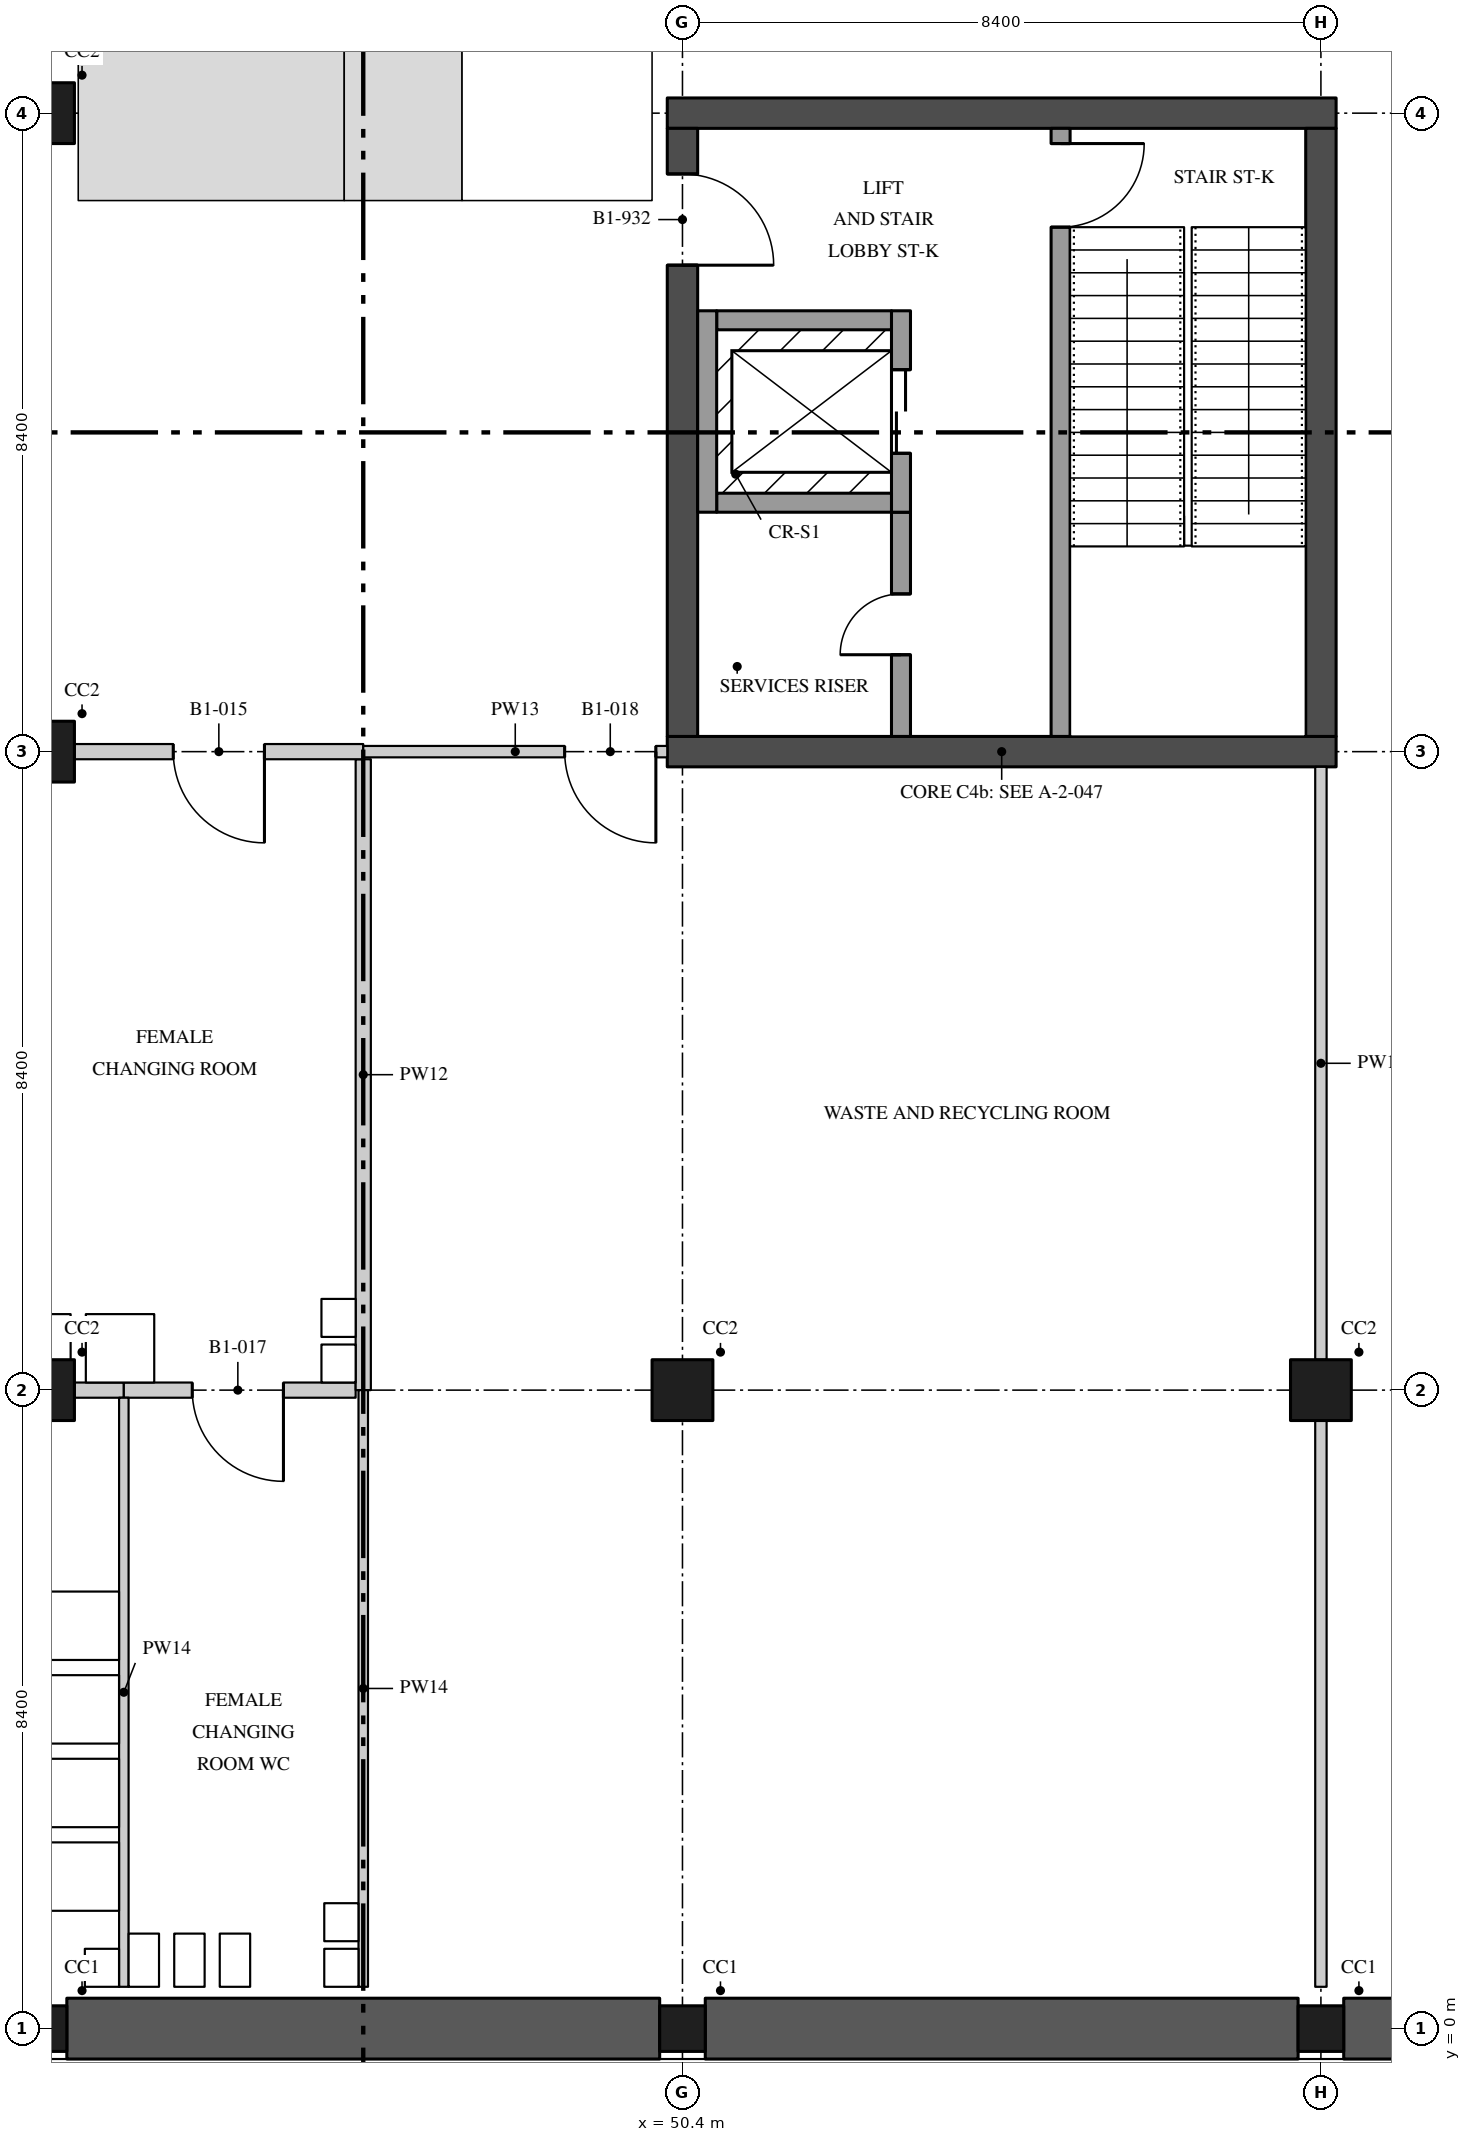
"""IFC4 building model, lengths in metres.
Left out: names, types, materials, properties, quantities, classifications, styles, units other than length and angle.
Written with IfcOpenShell. Run it as: python <this file> out.ifc"""

import sys

from ifc_helpers import new_model, si_unit, direction, frame, frame_2d, origin, origin_2d, place, context, subcontext, project, spatial, rectangle, extrude, element, fill, save


model = new_model("IFC4")
c1 = context("Model", 3, precision=1e-05, world=origin(), true_north=direction((0.0, 1.0)))
c2 = subcontext(c1, "Body", "Model", "MODEL_VIEW")
j1 = project(units=[si_unit("LENGTHUNIT", "METRE"), si_unit("PLANEANGLEUNIT", "RADIAN")], contexts=[c1])
p1 = place(None, origin())
s1 = spatial("IfcSite", under=j1, at=p1, CompositionType="ELEMENT")
p2 = place(p1, origin())
s2 = spatial("IfcBuilding", under=s1, at=p2, CompositionType="ELEMENT")
p3 = place(p2, frame((0.0, 0.0, -4.5)))
s3 = spatial("IfcBuildingStorey", under=s2, at=p3, CompositionType="ELEMENT", Elevation=-4.5)
p4 = place(p3, frame((42.0, 0.0, 0.0), z_axis=(0.0, 0.0, 1.0), x_axis=(1.0, 0.0, 0.0)))
e1 = element("IfcColumn", 1, at=p4, inside=s3, PredefinedType="COLUMN", context=c2, shape_type="SweptSolid", body=[
    extrude(rectangle(XDim=0.6, YDim=0.6, at=origin_2d()), origin(), (0.0, 0.0, 1.0), 4.05),
])
for number, where, z_axis, x_axis in (
    (2, (42.0, 8.4, 0.0), (0.0, 0.0, 1.0), (1.0, 0.0, 0.0)),
    (3, (42.0, 16.8, 0.0), (0.0, 0.0, 1.0), (1.0, 0.0, 0.0)),
    (4, (42.0, 25.2, 0.0), (0.0, 0.0, 1.0), (1.0, 0.0, 0.0)),
):
    element("IfcColumn", number, at=place(p3, frame(where, z_axis=z_axis, x_axis=x_axis)), inside=s3, PredefinedType="COLUMN", context=c2, shape_type="SweptSolid", body=[
        extrude(rectangle(XDim=0.8, YDim=0.8, at=origin_2d()), origin(), (0.0, 0.0, 1.0), 4.05),
    ])
p5 = place(p3, frame((50.4, 0.0, 0.0), z_axis=(0.0, 0.0, 1.0), x_axis=(1.0, 0.0, 0.0)))
e5 = element("IfcColumn", 5, at=p5, inside=s3, PredefinedType="COLUMN", context=c2, shape_type="SweptSolid", body=[
    extrude(rectangle(XDim=0.6, YDim=0.6, at=origin_2d()), origin(), (0.0, 0.0, 1.0), 4.05),
])
p6 = place(p3, frame((50.4, 8.4, 0.0), z_axis=(0.0, 0.0, 1.0), x_axis=(1.0, 0.0, 0.0)))
e6 = element("IfcColumn", 6, at=p6, inside=s3, PredefinedType="COLUMN", context=c2, shape_type="SweptSolid", body=[
    extrude(rectangle(XDim=0.8, YDim=0.8, at=origin_2d()), origin(), (0.0, 0.0, 1.0), 4.05),
])
p7 = place(p3, frame((58.8, 0.0, 0.0), z_axis=(0.0, 0.0, 1.0), x_axis=(1.0, 0.0, 0.0)))
e7 = element("IfcColumn", 7, at=p7, inside=s3, PredefinedType="COLUMN", context=c2, shape_type="SweptSolid", body=[
    extrude(rectangle(XDim=0.6, YDim=0.6, at=origin_2d()), origin(), (0.0, 0.0, 1.0), 4.05),
])
p8 = place(p3, frame((58.8, 8.4, 0.0), z_axis=(0.0, 0.0, 1.0), x_axis=(1.0, 0.0, 0.0)))
e8 = element("IfcColumn", 8, at=p8, inside=s3, PredefinedType="COLUMN", context=c2, shape_type="SweptSolid", body=[
    extrude(rectangle(XDim=0.8, YDim=0.8, at=origin_2d()), origin(), (0.0, 0.0, 1.0), 4.05),
])
for number, where, z_axis, x_axis in (
    (9, (42.3, 0.0, 0.0), (0.0, 0.0, 1.0), (1.0, 0.0, 0.0)),
    (10, (50.7, 0.0, 0.0), (0.0, 0.0, 1.0), (1.0, 0.0, 0.0)),
):
    element("IfcWall", number, at=place(p3, frame(where, z_axis=z_axis, x_axis=x_axis)), inside=s3, PredefinedType="SOLIDWALL", context=c2, shape_type="SweptSolid", body=[
        extrude(rectangle(XDim=7.8, YDim=0.8, at=frame_2d((3.9, 0.0))), origin(), (0.0, 0.0, 1.0), 4.05),
    ])
p9 = place(p3, frame((59.1, 0.0, 0.0), z_axis=(0.0, 0.0, 1.0), x_axis=(1.0, 0.0, 0.0)))
e11 = element("IfcWall", 11, at=p9, inside=s3, PredefinedType="SOLIDWALL", context=c2, shape_type="SweptSolid", body=[
    extrude(rectangle(XDim=7.8, YDim=0.8, at=frame_2d((3.9, 0.0))), origin(), (0.0, 0.0, 1.0), 4.05),
])
for number, where, z_axis, x_axis in (
    (12, (50.2, 16.8, 0.0), (0.0, 0.0, 1.0), (1.0, 0.0, 0.0)),
    (13, (50.2, 25.2, 0.0), (0.0, 0.0, 1.0), (1.0, 0.0, 0.0)),
):
    element("IfcWall", number, at=place(p3, frame(where, z_axis=z_axis, x_axis=x_axis)), inside=s3, PredefinedType="SHEAR", context=c2, shape_type="SweptSolid", body=[
        extrude(rectangle(XDim=8.8, YDim=0.4, at=frame_2d((4.4, 0.0))), origin(), (0.0, 0.0, 1.0), 4.05),
    ])
p10 = place(p3, frame((50.4, 17.0, 0.0), z_axis=(0.0, 0.0, 1.0), x_axis=(0.0, 1.0, 0.0)))
e14 = element("IfcWall", 14, at=p10, inside=s3, PredefinedType="SHEAR", context=c2, shape_type="SweptSolid", body=[
    extrude(rectangle(XDim=8.0, YDim=0.4, at=frame_2d((4.0, 0.0))), origin(), (0.0, 0.0, 1.0), 4.05),
])
p11 = place(p10, frame((6.2, 0.0, 0.0)))
e15 = element("IfcOpeningElement", 15, at=p11, cuts=e14, PredefinedType="OPENING", context=c2, shape_type="SweptSolid", body=[
    extrude(rectangle(XDim=1.2, YDim=2.1, at=frame_2d((0.6, 1.05))), frame((0.0, 0.21, 0.0), z_axis=(0.0, -1.0, 0.0), x_axis=(1.0, 0.0, 0.0)), (0.0, 0.0, 1.0), 0.42),
])
p12 = place(p3, frame((58.8, 17.0, 0.0), z_axis=(0.0, 0.0, 1.0), x_axis=(0.0, 1.0, 0.0)))
e16 = element("IfcWall", 16, at=p12, inside=s3, PredefinedType="SHEAR", context=c2, shape_type="SweptSolid", body=[
    extrude(rectangle(XDim=8.0, YDim=0.4, at=frame_2d((4.0, 0.0))), origin(), (0.0, 0.0, 1.0), 4.05),
])
p13 = place(p3, frame((55.375, 25.0, 0.0), z_axis=(0.0, 0.0, 1.0), x_axis=(0.0, -1.0, 0.0)))
e17 = element("IfcWall", 17, at=p13, inside=s3, PredefinedType="SOLIDWALL", context=c2, shape_type="SweptSolid", body=[
    extrude(rectangle(XDim=8.0, YDim=0.25, at=frame_2d((4.0, 0.0))), origin(), (0.0, 0.0, 1.0), 4.05),
])
p14 = place(p13, frame((0.2, 0.0, 0.0)))
e18 = element("IfcOpeningElement", 18, at=p14, cuts=e17, PredefinedType="OPENING", context=c2, shape_type="SweptSolid", body=[
    extrude(rectangle(XDim=1.1, YDim=2.1, at=frame_2d((0.55, 1.05))), frame((0.0, 0.135, 0.0), z_axis=(0.0, -1.0, 0.0), x_axis=(1.0, 0.0, 0.0)), (0.0, 0.0, 1.0), 0.27),
])
p15 = place(p3, frame((53.275, 19.95, 0.0), z_axis=(0.0, 0.0, 1.0), x_axis=(0.0, -1.0, 0.0)))
e19 = element("IfcWall", 19, at=p15, inside=s3, PredefinedType="SOLIDWALL", context=c2, shape_type="SweptSolid", body=[
    extrude(rectangle(XDim=2.95, YDim=0.25, at=frame_2d((1.475, 0.0))), origin(), (0.0, 0.0, 1.0), 4.05),
])
p16 = place(p15, frame((1.075, 0.0, 0.0)))
e20 = element("IfcOpeningElement", 20, at=p16, cuts=e19, PredefinedType="OPENING", context=c2, shape_type="SweptSolid", body=[
    extrude(rectangle(XDim=0.8, YDim=2.1, at=frame_2d((0.4, 1.05))), frame((0.0, 0.135, 0.0), z_axis=(0.0, -1.0, 0.0), x_axis=(1.0, 0.0, 0.0)), (0.0, 0.0, 1.0), 0.27),
])
p17 = place(p3, frame((53.275, 19.95, 0.0), z_axis=(0.0, 0.0, 1.0), x_axis=(0.0, 1.0, 0.0)))
e21 = element("IfcWall", 21, at=p17, inside=s3, PredefinedType="SOLIDWALL", context=c2, shape_type="SweptSolid", body=[
    extrude(rectangle(XDim=2.65, YDim=0.25, at=frame_2d((1.325, 0.0))), origin(), (0.0, 0.0, 1.0), 4.05),
])
p18 = place(p17, frame((0.775, 0.0, 0.0)))
e22 = element("IfcOpeningElement", 22, at=p18, cuts=e21, PredefinedType="OPENING", context=c2, shape_type="SweptSolid", body=[
    extrude(rectangle(XDim=1.1, YDim=2.1, at=frame_2d((0.55, 1.05))), frame((0.0, 0.135, 0.0), z_axis=(0.0, -1.0, 0.0), x_axis=(1.0, 0.0, 0.0)), (0.0, 0.0, 1.0), 0.27),
])
for number, where, z_axis, x_axis in (
    (23, (50.85, 22.475, 0.0), (0.0, 0.0, 1.0), (1.0, 0.0, 0.0)),
    (24, (50.85, 20.075, 0.0), (0.0, 0.0, 1.0), (1.0, 0.0, 0.0)),
):
    element("IfcWall", number, at=place(p3, frame(where, z_axis=z_axis, x_axis=x_axis)), inside=s3, PredefinedType="SOLIDWALL", context=c2, shape_type="SweptSolid", body=[
        extrude(rectangle(XDim=2.3, YDim=0.25, at=frame_2d((1.15, 0.0))), origin(), (0.0, 0.0, 1.0), 4.05),
    ])
p19 = place(p3, frame((50.725, 19.95, 0.0), z_axis=(0.0, 0.0, 1.0), x_axis=(0.0, 1.0, 0.0)))
e25 = element("IfcWall", 25, at=p19, inside=s3, PredefinedType="SOLIDWALL", context=c2, shape_type="SweptSolid", body=[
    extrude(rectangle(XDim=2.65, YDim=0.25, at=frame_2d((1.325, 0.0))), origin(), (0.0, 0.0, 1.0), 4.05),
])
p20 = place(p3, frame((42.4, 8.4, 0.0), z_axis=(0.0, 0.0, 1.0), x_axis=(1.0, 0.0, 0.0)))
e26 = element("IfcWall", 26, at=p20, inside=s3, PredefinedType="PARTITIONING", context=c2, shape_type="SweptSolid", body=[
    extrude(rectangle(XDim=0.65, YDim=0.2, at=frame_2d((0.325, 0.0))), origin(), (0.0, 0.0, 1.0), 4.05),
])
p21 = place(p3, frame((43.05, 8.4, 0.0), z_axis=(0.0, 0.0, 1.0), x_axis=(1.0, 0.0, 0.0)))
e27 = element("IfcWall", 27, at=p21, inside=s3, PredefinedType="PARTITIONING", context=c2, shape_type="SweptSolid", body=[
    extrude(rectangle(XDim=3.05, YDim=0.2, at=frame_2d((1.525, 0.0))), origin(), (0.0, 0.0, 1.0), 4.05),
])
p22 = place(p21, frame((0.9, 0.0, 0.0)))
e28 = element("IfcOpeningElement", 28, at=p22, cuts=e27, PredefinedType="OPENING", context=c2, shape_type="SweptSolid", body=[
    extrude(rectangle(XDim=1.2, YDim=2.1, at=frame_2d((0.6, 1.05))), frame((0.0, 0.11, 0.0), z_axis=(0.0, -1.0, 0.0), x_axis=(1.0, 0.0, 0.0)), (0.0, 0.0, 1.0), 0.22),
])
p23 = place(p3, frame((46.2, 8.4, 0.0), z_axis=(0.0, 0.0, 1.0), x_axis=(0.0, 1.0, 0.0)))
e29 = element("IfcWall", 29, at=p23, inside=s3, PredefinedType="PARTITIONING", context=c2, shape_type="SweptSolid", body=[
    extrude(rectangle(XDim=8.3, YDim=0.2, at=frame_2d((4.15, 0.0))), origin(), (0.0, 0.0, 1.0), 4.05),
])
p24 = place(p3, frame((42.4, 16.8, 0.0), z_axis=(0.0, 0.0, 1.0), x_axis=(1.0, 0.0, 0.0)))
e30 = element("IfcWall", 30, at=p24, inside=s3, PredefinedType="PARTITIONING", context=c2, shape_type="SweptSolid", body=[
    extrude(rectangle(XDim=3.8, YDim=0.2, at=frame_2d((1.9, 0.0))), origin(), (0.0, 0.0, 1.0), 4.05),
])
p25 = place(p24, frame((1.3, 0.0, 0.0)))
e31 = element("IfcOpeningElement", 31, at=p25, cuts=e30, PredefinedType="OPENING", context=c2, shape_type="SweptSolid", body=[
    extrude(rectangle(XDim=1.2, YDim=2.1, at=frame_2d((0.6, 1.05))), frame((0.0, 0.11, 0.0), z_axis=(0.0, -1.0, 0.0), x_axis=(1.0, 0.0, 0.0)), (0.0, 0.0, 1.0), 0.22),
])
p26 = place(p3, frame((43.05, 0.55, 0.0), z_axis=(0.0, 0.0, 1.0), x_axis=(0.0, 1.0, 0.0)))
e32 = element("IfcWall", 32, at=p26, inside=s3, PredefinedType="PARTITIONING", context=c2, shape_type="SweptSolid", body=[
    extrude(rectangle(XDim=7.75, YDim=0.125, at=frame_2d((3.875, 0.0))), origin(), (0.0, 0.0, 1.0), 4.05),
])
p27 = place(p3, frame((46.2, 0.55, 0.0), z_axis=(0.0, 0.0, 1.0), x_axis=(0.0, 1.0, 0.0)))
e33 = element("IfcWall", 33, at=p27, inside=s3, PredefinedType="PARTITIONING", context=c2, shape_type="SweptSolid", body=[
    extrude(rectangle(XDim=7.85, YDim=0.125, at=frame_2d((3.925, 0.0))), origin(), (0.0, 0.0, 1.0), 4.05),
])
p28 = place(p3, frame((46.2, 16.8, 0.0), z_axis=(0.0, 0.0, 1.0), x_axis=(1.0, 0.0, 0.0)))
e34 = element("IfcWall", 34, at=p28, inside=s3, PredefinedType="PARTITIONING", context=c2, shape_type="SweptSolid", body=[
    extrude(rectangle(XDim=4.0, YDim=0.15, at=frame_2d((2.0, 0.0))), origin(), (0.0, 0.0, 1.0), 4.05),
])
p29 = place(p28, frame((2.65, 0.0, 0.0)))
e35 = element("IfcOpeningElement", 35, at=p29, cuts=e34, PredefinedType="OPENING", context=c2, shape_type="SweptSolid", body=[
    extrude(rectangle(XDim=1.2, YDim=2.1, at=frame_2d((0.6, 1.05))), frame((0.0, 0.085, 0.0), z_axis=(0.0, -1.0, 0.0), x_axis=(1.0, 0.0, 0.0)), (0.0, 0.0, 1.0), 0.17),
])
p30 = place(p3, frame((58.8, 0.55, 0.0), z_axis=(0.0, 0.0, 1.0), x_axis=(0.0, 1.0, 0.0)))
e36 = element("IfcWall", 36, at=p30, inside=s3, PredefinedType="PARTITIONING", context=c2, shape_type="SweptSolid", body=[
    extrude(rectangle(XDim=7.45, YDim=0.15, at=frame_2d((3.725, 0.0))), origin(), (0.0, 0.0, 1.0), 4.05),
])
p31 = place(p3, frame((58.8, 8.8, 0.0), z_axis=(0.0, 0.0, 1.0), x_axis=(0.0, 1.0, 0.0)))
e37 = element("IfcWall", 37, at=p31, inside=s3, PredefinedType="PARTITIONING", context=c2, shape_type="SweptSolid", body=[
    extrude(rectangle(XDim=7.8, YDim=0.15, at=frame_2d((3.9, 0.0))), origin(), (0.0, 0.0, 1.0), 4.05),
])
p32 = place(p11, frame((1.2, 0.0, 0.0), z_axis=(0.0, 0.0, 1.0), x_axis=(-1.0, 0.0, 0.0)))
e38 = element("IfcDoor", 38, at=p32, inside=s3, OperationType="SINGLE_SWING_LEFT", PredefinedType="DOOR", context=c2, shape_type="SweptSolid", body=[
    extrude(rectangle(XDim=1.2, YDim=2.1, at=frame_2d((0.6, 1.05))), frame((0.0, 0.035, 0.0), z_axis=(0.0, -1.0, 0.0), x_axis=(1.0, 0.0, 0.0)), (0.0, 0.0, 1.0), 0.07),
])
fill(e15, e38)
p33 = place(p16, frame((0.8, 0.0, 0.0), z_axis=(0.0, 0.0, 1.0), x_axis=(-1.0, 0.0, 0.0)))
e39 = element("IfcDoor", 39, at=p33, inside=s3, OperationType="SINGLE_SWING_RIGHT", PredefinedType="DOOR", context=c2, shape_type="SweptSolid", body=[
    extrude(rectangle(XDim=0.8, YDim=2.1, at=frame_2d((0.4, 1.05))), frame((0.0, 0.035, 0.0), z_axis=(0.0, -1.0, 0.0), x_axis=(1.0, 0.0, 0.0)), (0.0, 0.0, 1.0), 0.07),
])
fill(e20, e39)
p34 = place(p14, origin())
e40 = element("IfcDoor", 40, at=p34, inside=s3, OperationType="SINGLE_SWING_RIGHT", PredefinedType="DOOR", context=c2, shape_type="SweptSolid", body=[
    extrude(rectangle(XDim=1.1, YDim=2.1, at=frame_2d((0.55, 1.05))), frame((0.0, 0.035, 0.0), z_axis=(0.0, -1.0, 0.0), x_axis=(1.0, 0.0, 0.0)), (0.0, 0.0, 1.0), 0.07),
])
fill(e18, e40)
p35 = place(p18, origin())
e41 = element("IfcDoor", 41, at=p35, inside=s3, OperationType="DOUBLE_DOOR_SLIDING", PredefinedType="DOOR", context=c2, shape_type="SweptSolid", body=[
    extrude(rectangle(XDim=1.1, YDim=2.1, at=frame_2d((0.55, 1.05))), frame((0.0, 0.04, 0.0), z_axis=(0.0, -1.0, 0.0), x_axis=(1.0, 0.0, 0.0)), (0.0, 0.0, 1.0), 0.08),
])
fill(e22, e41)
p36 = place(p25, frame((1.2, 0.0, 0.0), z_axis=(0.0, 0.0, 1.0), x_axis=(-1.0, 0.0, 0.0)))
e42 = element("IfcDoor", 42, at=p36, inside=s3, OperationType="SINGLE_SWING_RIGHT", PredefinedType="DOOR", context=c2, shape_type="SweptSolid", body=[
    extrude(rectangle(XDim=1.2, YDim=2.1, at=frame_2d((0.6, 1.05))), frame((0.0, 0.035, 0.0), z_axis=(0.0, -1.0, 0.0), x_axis=(1.0, 0.0, 0.0)), (0.0, 0.0, 1.0), 0.07),
])
fill(e31, e42)
p37 = place(p22, frame((1.2, 0.0, 0.0), z_axis=(0.0, 0.0, 1.0), x_axis=(-1.0, 0.0, 0.0)))
e43 = element("IfcDoor", 43, at=p37, inside=s3, OperationType="SINGLE_SWING_RIGHT", PredefinedType="DOOR", context=c2, shape_type="SweptSolid", body=[
    extrude(rectangle(XDim=1.2, YDim=2.1, at=frame_2d((0.6, 1.05))), frame((0.0, 0.035, 0.0), z_axis=(0.0, -1.0, 0.0), x_axis=(1.0, 0.0, 0.0)), (0.0, 0.0, 1.0), 0.07),
])
fill(e28, e43)
p38 = place(p29, frame((1.2, 0.0, 0.0), z_axis=(0.0, 0.0, 1.0), x_axis=(-1.0, 0.0, 0.0)))
e44 = element("IfcDoor", 44, at=p38, inside=s3, OperationType="SINGLE_SWING_RIGHT", PredefinedType="DOOR", context=c2, shape_type="SweptSolid", body=[
    extrude(rectangle(XDim=1.2, YDim=2.1, at=frame_2d((0.6, 1.05))), frame((0.0, 0.03, 0.0), z_axis=(0.0, -1.0, 0.0), x_axis=(1.0, 0.0, 0.0)), (0.0, 0.0, 1.0), 0.06),
])
fill(e35, e44)
save(model, sys.argv[1])
